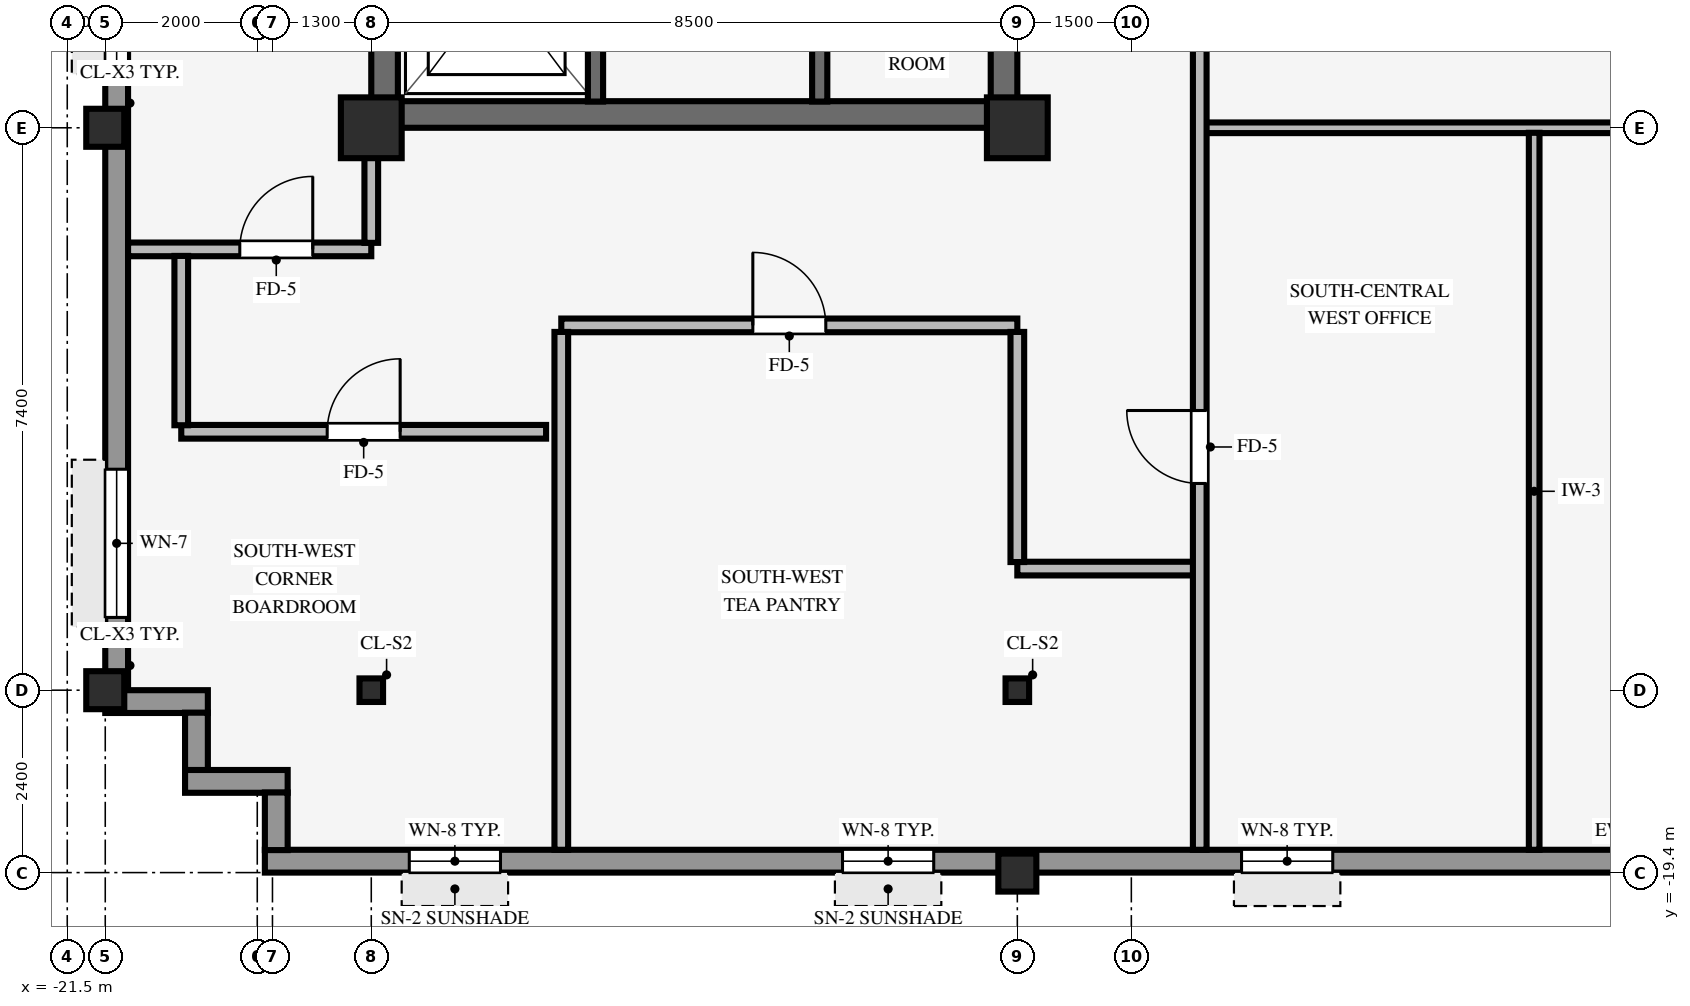
"""IFC4 building model, lengths in metres.
Left out: names, types, materials, properties, quantities, classifications, styles, units other than length and angle.
Written with IfcOpenShell. Run it as: python <this file> out.ifc"""

import sys

from ifc_helpers import new_model, si_unit, direction, frame, frame_2d, origin, origin_2d, place, context, subcontext, project, spatial, rectangle, hollow_rectangle, i_section, extrude, source, transform, mapped, element, fill, save


model = new_model("IFC4")
c1 = context("Model", 3, precision=1e-05, world=origin(), true_north=direction((0.0, 1.0)))
c2 = subcontext(c1, "Body", "Model", "MODEL_VIEW")
j1 = project(units=[si_unit("LENGTHUNIT", "METRE"), si_unit("PLANEANGLEUNIT", "RADIAN")], contexts=[c1])
p1 = place(None, origin())
s1 = spatial("IfcSite", under=j1, at=p1, CompositionType="ELEMENT")
p2 = place(p1, origin())
s2 = spatial("IfcBuilding", under=s1, at=p2, CompositionType="ELEMENT")
p3 = place(p2, frame((0.0, 0.0, 268.9)))
s3 = spatial("IfcBuildingStorey", under=s2, at=p3, CompositionType="ELEMENT", Elevation=268.9)
p4 = place(p3, frame((-17.5, -9.425, 0.0), z_axis=(0.0, 0.0, 1.0), x_axis=(1.0, 0.0, 0.0)))
e1 = element("IfcWall", 1, at=p4, inside=s3, PredefinedType="SHEAR", context=c2, shape_type="SweptSolid", body=[
    extrude(rectangle(XDim=8.5, YDim=0.35, at=frame_2d((4.25, 0.0))), origin(), (0.0, 0.0, 1.0), 3.37),
])
p5 = place(p3, frame((-17.325, -9.255, 0.0), z_axis=(0.0, 0.0, 1.0), x_axis=(0.0, 1.0, 0.0)))
e2 = element("IfcWall", 2, at=p5, inside=s3, PredefinedType="SHEAR", context=c2, shape_type="SweptSolid", body=[
    extrude(rectangle(XDim=18.51, YDim=0.35, at=frame_2d((9.255, 0.0))), origin(), (0.0, 0.0, 1.0), 3.37),
])
p6 = place(p3, frame((-9.175, -9.255, 0.0), z_axis=(0.0, 0.0, 1.0), x_axis=(0.0, 1.0, 0.0)))
e3 = element("IfcWall", 3, at=p6, inside=s3, PredefinedType="SHEAR", context=c2, shape_type="SweptSolid", body=[
    extrude(rectangle(XDim=18.51, YDim=0.35, at=frame_2d((9.255, 0.0))), origin(), (0.0, 0.0, 1.0), 3.37),
])
p7 = place(p6, frame((8.655, 0.0, 0.0)))
e4 = element("IfcOpeningElement", 4, at=p7, cuts=e3, PredefinedType="OPENING", context=c2, shape_type="SweptSolid", body=[
    extrude(rectangle(XDim=1.2, YDim=2.15, at=frame_2d((0.6, 1.075))), frame((0.0, 0.185, 0.0), z_axis=(0.0, -1.0, 0.0), x_axis=(1.0, 0.0, 0.0)), (0.0, 0.0, 1.0), 0.37),
])
for number, where, z_axis, x_axis in (
    (5, (-17.5, -9.6, 0.0), (0.0, 0.0, 1.0), (1.0, 0.0, 0.0)),
    (6, (-9.0, -9.6, 0.0), (0.0, 0.0, 1.0), (1.0, 0.0, 0.0)),
):
    element("IfcColumn", number, at=place(p3, frame(where, z_axis=z_axis, x_axis=x_axis)), inside=s3, PredefinedType="COLUMN", context=c2, shape_type="SweptSolid", body=[
        extrude(rectangle(XDim=0.8, YDim=0.8, at=origin_2d()), origin(), (0.0, 0.0, 1.0), 3.37),
    ])
for number, where, z_axis, x_axis in (
    (7, (-21.0, -17.0, 0.0), (0.0, 0.0, 1.0), (1.0, 0.0, 0.0)),
    (8, (-21.0, -9.6, 0.0), (0.0, 0.0, 1.0), (1.0, 0.0, 0.0)),
    (9, (-9.0, -19.4, 0.0), (0.0, 0.0, 1.0), (1.0, 0.0, 0.0)),
):
    element("IfcColumn", number, at=place(p3, frame(where, z_axis=z_axis, x_axis=x_axis)), inside=s3, PredefinedType="COLUMN", context=c2, shape_type="SweptSolid", body=[
        extrude(hollow_rectangle(XDim=0.5, YDim=0.5, WallThickness=0.032, InnerFilletRadius=0.032, OuterFilletRadius=0.064, at=origin_2d()), origin(), (0.0, 0.0, 1.0), 3.37),
    ])
for number, where, z_axis, x_axis in (
    (10, (-17.5, -17.0, 0.0), (0.0, 0.0, 1.0), (1.0, 0.0, 0.0)),
    (11, (-9.0, -17.0, 0.0), (0.0, 0.0, 1.0), (1.0, 0.0, 0.0)),
):
    element("IfcColumn", number, at=place(p3, frame(where, z_axis=z_axis, x_axis=x_axis)), inside=s3, PredefinedType="COLUMN", context=c2, shape_type="SweptSolid", body=[
        extrude(i_section(OverallWidth=0.31, OverallDepth=0.31, WebThickness=0.015, FlangeThickness=0.015, FilletRadius=0.015, at=origin_2d()), origin(), (0.0, 0.0, 1.0), 3.37),
    ])
p8 = place(p3, frame((-18.9, -19.25, 0.0), z_axis=(0.0, 0.0, 1.0), x_axis=(1.0, 0.0, 0.0)))
e12 = element("IfcWall", 12, at=p8, inside=s3, PredefinedType="STANDARD", context=c2, shape_type="SweptSolid", body=[
    extrude(rectangle(XDim=35.6, YDim=0.3, at=frame_2d((17.8, 0.0))), origin(), (0.0, 0.0, 1.0), 2.705),
])
p9 = place(p8, frame((1.9, 0.0, 0.8)))
e13 = element("IfcOpeningElement", 13, at=p9, cuts=e12, PredefinedType="OPENING", context=c2, shape_type="SweptSolid", body=[
    extrude(rectangle(XDim=1.2, YDim=1.48, at=frame_2d((0.6, 0.74))), frame((0.0, 0.16, 0.0), z_axis=(0.0, -1.0, 0.0), x_axis=(1.0, 0.0, 0.0)), (0.0, 0.0, 1.0), 0.32),
])
p10 = place(p8, frame((7.6, 0.0, 0.8)))
e14 = element("IfcOpeningElement", 14, at=p10, cuts=e12, PredefinedType="OPENING", context=c2, shape_type="SweptSolid", body=[
    extrude(rectangle(XDim=1.2, YDim=1.48, at=frame_2d((0.6, 0.74))), frame((0.0, 0.16, 0.0), z_axis=(0.0, -1.0, 0.0), x_axis=(1.0, 0.0, 0.0)), (0.0, 0.0, 1.0), 0.32),
])
p11 = place(p8, frame((12.85, 0.0, 0.8)))
e15 = element("IfcOpeningElement", 15, at=p11, cuts=e12, PredefinedType="OPENING", context=c2, shape_type="SweptSolid", body=[
    extrude(rectangle(XDim=1.2, YDim=1.48, at=frame_2d((0.6, 0.74))), frame((0.0, 0.16, 0.0), z_axis=(0.0, -1.0, 0.0), x_axis=(1.0, 0.0, 0.0)), (0.0, 0.0, 1.0), 0.32),
])
p12 = place(p8, frame((22.0, 0.0, 0.8)))
e16 = element("IfcOpeningElement", 16, at=p12, cuts=e12, PredefinedType="OPENING", context=c2, shape_type="SweptSolid", body=[
    extrude(rectangle(XDim=1.2, YDim=1.48, at=frame_2d((0.6, 0.74))), frame((0.0, 0.16, 0.0), z_axis=(0.0, -1.0, 0.0), x_axis=(1.0, 0.0, 0.0)), (0.0, 0.0, 1.0), 0.32),
])
p13 = place(p8, frame((25.9, 0.0, 0.8)))
e17 = element("IfcOpeningElement", 17, at=p13, cuts=e12, PredefinedType="OPENING", context=c2, shape_type="SweptSolid", body=[
    extrude(rectangle(XDim=1.2, YDim=1.48, at=frame_2d((0.6, 0.74))), frame((0.0, 0.16, 0.0), z_axis=(0.0, -1.0, 0.0), x_axis=(1.0, 0.0, 0.0)), (0.0, 0.0, 1.0), 0.32),
])
p14 = place(p8, frame((31.6, 0.0, 0.8)))
e18 = element("IfcOpeningElement", 18, at=p14, cuts=e12, PredefinedType="OPENING", context=c2, shape_type="SweptSolid", body=[
    extrude(rectangle(XDim=1.2, YDim=1.48, at=frame_2d((0.6, 0.74))), frame((0.0, 0.16, 0.0), z_axis=(0.0, -1.0, 0.0), x_axis=(1.0, 0.0, 0.0)), (0.0, 0.0, 1.0), 0.32),
])
p15 = place(p3, frame((-20.85, -17.004, 0.0), z_axis=(0.0, 0.0, 1.0), x_axis=(0.0, 1.0, 0.0)))
e19 = element("IfcWall", 19, at=p15, inside=s3, PredefinedType="STANDARD", context=c2, shape_type="SweptSolid", body=[
    extrude(rectangle(XDim=34.008, YDim=0.3, at=frame_2d((17.004, 0.0))), origin(), (0.0, 0.0, 1.0), 2.705),
])
p16 = place(p15, frame((0.961, 0.0, 0.8)))
e20 = element("IfcOpeningElement", 20, at=p16, cuts=e19, PredefinedType="OPENING", context=c2, shape_type="SweptSolid", body=[
    extrude(rectangle(XDim=1.95, YDim=1.48, at=frame_2d((0.975, 0.74))), frame((0.0, 0.16, 0.0), z_axis=(0.0, -1.0, 0.0), x_axis=(1.0, 0.0, 0.0)), (0.0, 0.0, 1.0), 0.32),
])
p17 = place(p15, frame((8.234, 0.0, 0.8)))
e21 = element("IfcOpeningElement", 21, at=p17, cuts=e19, PredefinedType="OPENING", context=c2, shape_type="SweptSolid", body=[
    extrude(rectangle(XDim=1.95, YDim=1.48, at=frame_2d((0.975, 0.74))), frame((0.0, 0.16, 0.0), z_axis=(0.0, -1.0, 0.0), x_axis=(1.0, 0.0, 0.0)), (0.0, 0.0, 1.0), 0.32),
])
p18 = place(p15, frame((11.006, 0.0, 0.8)))
e22 = element("IfcOpeningElement", 22, at=p18, cuts=e19, PredefinedType="OPENING", context=c2, shape_type="SweptSolid", body=[
    extrude(rectangle(XDim=1.95, YDim=1.48, at=frame_2d((0.975, 0.74))), frame((0.0, 0.16, 0.0), z_axis=(0.0, -1.0, 0.0), x_axis=(1.0, 0.0, 0.0)), (0.0, 0.0, 1.0), 0.32),
])
p19 = place(p15, frame((20.602, 0.0, 0.8)))
e23 = element("IfcOpeningElement", 23, at=p19, cuts=e19, PredefinedType="OPENING", context=c2, shape_type="SweptSolid", body=[
    extrude(rectangle(XDim=1.95, YDim=1.48, at=frame_2d((0.975, 0.74))), frame((0.0, 0.16, 0.0), z_axis=(0.0, -1.0, 0.0), x_axis=(1.0, 0.0, 0.0)), (0.0, 0.0, 1.0), 0.32),
])
p20 = place(p15, frame((23.824, 0.0, 0.8)))
e24 = element("IfcOpeningElement", 24, at=p20, cuts=e19, PredefinedType="OPENING", context=c2, shape_type="SweptSolid", body=[
    extrude(rectangle(XDim=1.95, YDim=1.48, at=frame_2d((0.975, 0.74))), frame((0.0, 0.16, 0.0), z_axis=(0.0, -1.0, 0.0), x_axis=(1.0, 0.0, 0.0)), (0.0, 0.0, 1.0), 0.32),
])
p21 = place(p15, frame((31.097, 0.0, 0.8)))
e25 = element("IfcOpeningElement", 25, at=p21, cuts=e19, PredefinedType="OPENING", context=c2, shape_type="SweptSolid", body=[
    extrude(rectangle(XDim=1.95, YDim=1.48, at=frame_2d((0.975, 0.74))), frame((0.0, 0.16, 0.0), z_axis=(0.0, -1.0, 0.0), x_axis=(1.0, 0.0, 0.0)), (0.0, 0.0, 1.0), 0.32),
])
p22 = place(p3, frame((-21.0, -17.15, 0.0), z_axis=(0.0, 0.0, 1.0), x_axis=(1.0, 0.0, 0.0)))
e26 = element("IfcWall", 26, at=p22, inside=s3, PredefinedType="STANDARD", context=c2, shape_type="SweptSolid", body=[
    extrude(rectangle(XDim=1.35, YDim=0.3, at=frame_2d((0.675, 0.0))), origin(), (0.0, 0.0, 1.0), 2.892),
])
p23 = place(p3, frame((-19.8, -18.054, 0.0), z_axis=(0.0, 0.0, 1.0), x_axis=(0.0, 1.0, 0.0)))
e27 = element("IfcWall", 27, at=p23, inside=s3, PredefinedType="STANDARD", context=c2, shape_type="SweptSolid", body=[
    extrude(rectangle(XDim=0.758, YDim=0.3, at=frame_2d((0.379, 0.0))), origin(), (0.0, 0.0, 1.0), 2.892),
])
p24 = place(p3, frame((-19.95, -18.2, 0.0), z_axis=(0.0, 0.0, 1.0), x_axis=(1.0, 0.0, 0.0)))
e28 = element("IfcWall", 28, at=p24, inside=s3, PredefinedType="STANDARD", context=c2, shape_type="SweptSolid", body=[
    extrude(rectangle(XDim=1.35, YDim=0.3, at=frame_2d((0.675, 0.0))), origin(), (0.0, 0.0, 1.0), 2.892),
])
p25 = place(p3, frame((-18.75, -19.104, 0.0), z_axis=(0.0, 0.0, 1.0), x_axis=(0.0, 1.0, 0.0)))
e29 = element("IfcWall", 29, at=p25, inside=s3, PredefinedType="STANDARD", context=c2, shape_type="SweptSolid", body=[
    extrude(rectangle(XDim=0.758, YDim=0.3, at=frame_2d((0.379, 0.0))), origin(), (0.0, 0.0, 1.0), 2.892),
])
p26 = place(p3, frame((-14.55, -9.255, 0.0), z_axis=(0.0, 0.0, 1.0), x_axis=(0.0, 1.0, 0.0)))
e30 = element("IfcWall", 30, at=p26, inside=s3, PredefinedType="SHEAR", context=c2, shape_type="SweptSolid", body=[
    extrude(rectangle(XDim=3.06, YDim=0.2, at=frame_2d((1.53, 0.0))), origin(), (0.0, 0.0, 1.0), 3.37),
])
p27 = place(p26, frame((0.98, 0.0, 0.0)))
e31 = element("IfcOpeningElement", 31, at=p27, cuts=e30, PredefinedType="OPENING", context=c2, shape_type="SweptSolid", body=[
    extrude(rectangle(XDim=1.15, YDim=2.15, at=frame_2d((0.575, 1.075))), frame((0.0, 0.11, 0.0), z_axis=(0.0, -1.0, 0.0), x_axis=(1.0, 0.0, 0.0)), (0.0, 0.0, 1.0), 0.22),
])
p28 = place(p3, frame((-11.6, -9.255, 0.0), z_axis=(0.0, 0.0, 1.0), x_axis=(0.0, 1.0, 0.0)))
e32 = element("IfcWall", 32, at=p28, inside=s3, PredefinedType="SHEAR", context=c2, shape_type="SweptSolid", body=[
    extrude(rectangle(XDim=8.025, YDim=0.2, at=frame_2d((4.012, 0.0))), origin(), (0.0, 0.0, 1.0), 3.37),
])
p29 = place(p28, frame((1.615, 0.0, 0.0)))
e33 = element("IfcOpeningElement", 33, at=p29, cuts=e32, PredefinedType="OPENING", context=c2, shape_type="SweptSolid", body=[
    extrude(rectangle(XDim=0.88, YDim=2.1, at=frame_2d((0.44, 1.05))), frame((0.0, 0.11, 0.0), z_axis=(0.0, -1.0, 0.0), x_axis=(1.0, 0.0, 0.0)), (0.0, 0.0, 1.0), 0.22),
])
p30 = place(p28, frame((5.615, 0.0, 0.0)))
e34 = element("IfcOpeningElement", 34, at=p30, cuts=e32, PredefinedType="OPENING", context=c2, shape_type="SweptSolid", body=[
    extrude(rectangle(XDim=0.88, YDim=2.1, at=frame_2d((0.44, 1.05))), frame((0.0, 0.11, 0.0), z_axis=(0.0, -1.0, 0.0), x_axis=(1.0, 0.0, 0.0)), (0.0, 0.0, 1.0), 0.22),
])
p31 = place(p3, frame((-9.0, -15.4, 0.0), z_axis=(0.0, 0.0, 1.0), x_axis=(1.0, 0.0, 0.0)))
e35 = element("IfcWall", 35, at=p31, inside=s3, PredefinedType="PARTITIONING", context=c2, shape_type="SweptSolid", body=[
    extrude(rectangle(XDim=2.334, YDim=0.18, at=frame_2d((1.167, 0.0))), origin(), (0.0, 0.0, 1.0), 3.36),
])
p32 = place(p3, frame((-20.0, -13.6, 0.0), z_axis=(0.0, 0.0, 1.0), x_axis=(1.0, 0.0, 0.0)))
e36 = element("IfcWall", 36, at=p32, inside=s3, PredefinedType="PARTITIONING", context=c2, shape_type="SweptSolid", body=[
    extrude(rectangle(XDim=4.8, YDim=0.18, at=frame_2d((2.4, 0.0))), origin(), (0.0, 0.0, 1.0), 3.038),
])
p33 = place(p32, frame((1.92, 0.0, 0.0)))
e37 = element("IfcOpeningElement", 37, at=p33, cuts=e36, PredefinedType="OPENING", context=c2, shape_type="SweptSolid", body=[
    extrude(rectangle(XDim=0.96, YDim=2.1, at=frame_2d((0.48, 1.05))), frame((0.0, 0.1, 0.0), z_axis=(0.0, -1.0, 0.0), x_axis=(1.0, 0.0, 0.0)), (0.0, 0.0, 1.0), 0.2),
])
p34 = place(p3, frame((-15.0, -12.2, 0.0), z_axis=(0.0, 0.0, 1.0), x_axis=(1.0, 0.0, 0.0)))
e38 = element("IfcWall", 38, at=p34, inside=s3, PredefinedType="PARTITIONING", context=c2, shape_type="SweptSolid", body=[
    extrude(rectangle(XDim=6.0, YDim=0.18, at=frame_2d((3.0, 0.0))), origin(), (0.0, 0.0, 1.0), 3.36),
])
p35 = place(p34, frame((2.52, 0.0, 0.0)))
e39 = element("IfcOpeningElement", 39, at=p35, cuts=e38, PredefinedType="OPENING", context=c2, shape_type="SweptSolid", body=[
    extrude(rectangle(XDim=0.96, YDim=2.1, at=frame_2d((0.48, 1.05))), frame((0.0, 0.1, 0.0), z_axis=(0.0, -1.0, 0.0), x_axis=(1.0, 0.0, 0.0)), (0.0, 0.0, 1.0), 0.2),
])
p36 = place(p3, frame((-20.7, -11.2, 0.0), z_axis=(0.0, 0.0, 1.0), x_axis=(1.0, 0.0, 0.0)))
e40 = element("IfcWall", 40, at=p36, inside=s3, PredefinedType="PARTITIONING", context=c2, shape_type="SweptSolid", body=[
    extrude(rectangle(XDim=3.2, YDim=0.18, at=frame_2d((1.6, 0.0))), origin(), (0.0, 0.0, 1.0), 3.36),
])
p37 = place(p36, frame((1.47, 0.0, 0.0)))
e41 = element("IfcOpeningElement", 41, at=p37, cuts=e40, PredefinedType="OPENING", context=c2, shape_type="SweptSolid", body=[
    extrude(rectangle(XDim=0.96, YDim=2.1, at=frame_2d((0.48, 1.05))), frame((0.0, 0.1, 0.0), z_axis=(0.0, -1.0, 0.0), x_axis=(1.0, 0.0, 0.0)), (0.0, 0.0, 1.0), 0.2),
])
p38 = place(p3, frame((-6.534, -9.6, 0.0), z_axis=(0.0, 0.0, 1.0), x_axis=(1.0, 0.0, 0.0)))
e42 = element("IfcWall", 42, at=p38, inside=s3, PredefinedType="PARTITIONING", context=c2, shape_type="SweptSolid", body=[
    extrude(rectangle(XDim=6.383, YDim=0.14, at=frame_2d((3.191, 0.0))), origin(), (0.0, 0.0, 1.0), 2.405),
])
p39 = place(p3, frame((-20.0, -13.514, 0.0), z_axis=(0.0, 0.0, 1.0), x_axis=(0.0, 1.0, 0.0)))
e43 = element("IfcWall", 43, at=p39, inside=s3, PredefinedType="PARTITIONING", context=c2, shape_type="SweptSolid", body=[
    extrude(rectangle(XDim=2.228, YDim=0.18, at=frame_2d((1.114, 0.0))), origin(), (0.0, 0.0, 1.0), 3.36),
])
p40 = place(p3, frame((-17.5, -11.114, 0.0), z_axis=(0.0, 0.0, 1.0), x_axis=(0.0, 1.0, 0.0)))
e44 = element("IfcWall", 44, at=p40, inside=s3, PredefinedType="PARTITIONING", context=c2, shape_type="SweptSolid", body=[
    extrude(rectangle(XDim=1.118, YDim=0.18, at=frame_2d((0.559, 0.0))), origin(), (0.0, 0.0, 1.0), 2.892),
])
p41 = place(p3, frame((-15.0, -19.1, 0.0), z_axis=(0.0, 0.0, 1.0), x_axis=(0.0, 1.0, 0.0)))
e45 = element("IfcWall", 45, at=p41, inside=s3, PredefinedType="PARTITIONING", context=c2, shape_type="SweptSolid", body=[
    extrude(rectangle(XDim=6.814, YDim=0.18, at=frame_2d((3.407, 0.0))), origin(), (0.0, 0.0, 1.0), 3.36),
])
p42 = place(p3, frame((-9.0, -15.314, 0.0), z_axis=(0.0, 0.0, 1.0), x_axis=(0.0, 1.0, 0.0)))
e46 = element("IfcWall", 46, at=p42, inside=s3, PredefinedType="PARTITIONING", context=c2, shape_type="SweptSolid", body=[
    extrude(rectangle(XDim=3.028, YDim=0.18, at=frame_2d((1.514, 0.0))), origin(), (0.0, 0.0, 1.0), 2.892),
])
p43 = place(p3, frame((-6.6, -19.1, 0.0), z_axis=(0.0, 0.0, 1.0), x_axis=(0.0, 1.0, 0.0)))
e47 = element("IfcWall", 47, at=p43, inside=s3, PredefinedType="PARTITIONING", context=c2, shape_type="SweptSolid", body=[
    extrude(rectangle(XDim=17.764, YDim=0.18, at=frame_2d((8.882, 0.0))), origin(), (0.0, 0.0, 1.0), 3.36),
])
p44 = place(p43, frame((4.82, 0.0, 0.0)))
e48 = element("IfcOpeningElement", 48, at=p44, cuts=e47, PredefinedType="OPENING", context=c2, shape_type="SweptSolid", body=[
    extrude(rectangle(XDim=0.96, YDim=2.1, at=frame_2d((0.48, 1.05))), frame((0.0, 0.1, 0.0), z_axis=(0.0, -1.0, 0.0), x_axis=(1.0, 0.0, 0.0)), (0.0, 0.0, 1.0), 0.2),
])
p45 = place(p3, frame((-2.2, -19.1, 0.0), z_axis=(0.0, 0.0, 1.0), x_axis=(0.0, 1.0, 0.0)))
e49 = element("IfcWall", 49, at=p45, inside=s3, PredefinedType="PARTITIONING", context=c2, shape_type="SweptSolid", body=[
    extrude(rectangle(XDim=9.434, YDim=0.14, at=frame_2d((4.717, 0.0))), origin(), (0.0, 0.0, 1.0), 3.36),
])
m1 = source(origin(), c2, "Body", "SweptSolid", [
    extrude(rectangle(XDim=1.2, YDim=1.48, at=frame_2d((0.6, 0.74))), frame((0.0, 0.03, 0.0), z_axis=(0.0, -1.0, 0.0), x_axis=(1.0, 0.0, 0.0)), (0.0, 0.0, 1.0), 0.06),
])
p46 = place(p9, origin())
e50 = element("IfcWindow", 50, at=p46, inside=s3, PartitioningType="SINGLE_PANEL", PredefinedType="WINDOW", context=c2, shape_type="MappedRepresentation", body=[
    mapped(m1, transform((0.0, 0.0, 0.0), scale=1.0)),
])
fill(e13, e50)
p47 = place(p10, origin())
e51 = element("IfcWindow", 51, at=p47, inside=s3, PartitioningType="SINGLE_PANEL", PredefinedType="WINDOW", context=c2, shape_type="MappedRepresentation", body=[
    mapped(m1, transform((0.0, 0.0, 0.0), scale=1.0)),
])
fill(e14, e51)
p48 = place(p11, origin())
e52 = element("IfcWindow", 52, at=p48, inside=s3, PartitioningType="SINGLE_PANEL", PredefinedType="WINDOW", context=c2, shape_type="MappedRepresentation", body=[
    mapped(m1, transform((0.0, 0.0, 0.0), scale=1.0)),
])
fill(e15, e52)
m2 = source(origin(), c2, "Body", "SweptSolid", [
    extrude(rectangle(XDim=1.95, YDim=1.48, at=frame_2d((0.975, 0.74))), frame((0.0, 0.03, 0.0), z_axis=(0.0, -1.0, 0.0), x_axis=(1.0, 0.0, 0.0)), (0.0, 0.0, 1.0), 0.06),
])
p49 = place(p16, origin())
e53 = element("IfcWindow", 53, at=p49, inside=s3, PartitioningType="SINGLE_PANEL", PredefinedType="WINDOW", context=c2, shape_type="MappedRepresentation", body=[
    mapped(m2, transform((0.0, 0.0, 0.0), scale=1.0)),
])
fill(e20, e53)
p50 = place(p17, origin())
e54 = element("IfcWindow", 54, at=p50, inside=s3, PartitioningType="SINGLE_PANEL", PredefinedType="WINDOW", context=c2, shape_type="MappedRepresentation", body=[
    mapped(m2, transform((0.0, 0.0, 0.0), scale=1.0)),
])
fill(e21, e54)
m3 = source(origin(), c2, "Body", "SweptSolid", [
    extrude(rectangle(XDim=0.96, YDim=2.1, at=frame_2d((0.48, 1.05))), frame((0.0, 0.025, 0.0), z_axis=(0.0, -1.0, 0.0), x_axis=(1.0, 0.0, 0.0)), (0.0, 0.0, 1.0), 0.05),
])
p51 = place(p35, origin())
e55 = element("IfcDoor", 55, at=p51, inside=s3, OperationType="SINGLE_SWING_LEFT", PredefinedType="DOOR", context=c2, shape_type="MappedRepresentation", body=[
    mapped(m3, transform((0.0, 0.0, 0.0), scale=1.0)),
])
fill(e39, e55)
p52 = place(p33, origin())
e56 = element("IfcDoor", 56, at=p52, inside=s3, OperationType="SINGLE_SWING_RIGHT", PredefinedType="DOOR", context=c2, shape_type="MappedRepresentation", body=[
    mapped(m3, transform((0.0, 0.0, 0.0), scale=1.0)),
])
fill(e37, e56)
p53 = place(p44, origin())
e57 = element("IfcDoor", 57, at=p53, inside=s3, OperationType="SINGLE_SWING_RIGHT", PredefinedType="DOOR", context=c2, shape_type="MappedRepresentation", body=[
    mapped(m3, transform((0.0, 0.0, 0.0), scale=1.0)),
])
fill(e48, e57)
p54 = place(p37, origin())
e58 = element("IfcDoor", 58, at=p54, inside=s3, OperationType="SINGLE_SWING_RIGHT", PredefinedType="DOOR", context=c2, shape_type="MappedRepresentation", body=[
    mapped(m3, transform((0.0, 0.0, 0.0), scale=1.0)),
])
fill(e41, e58)
save(model, sys.argv[1])
